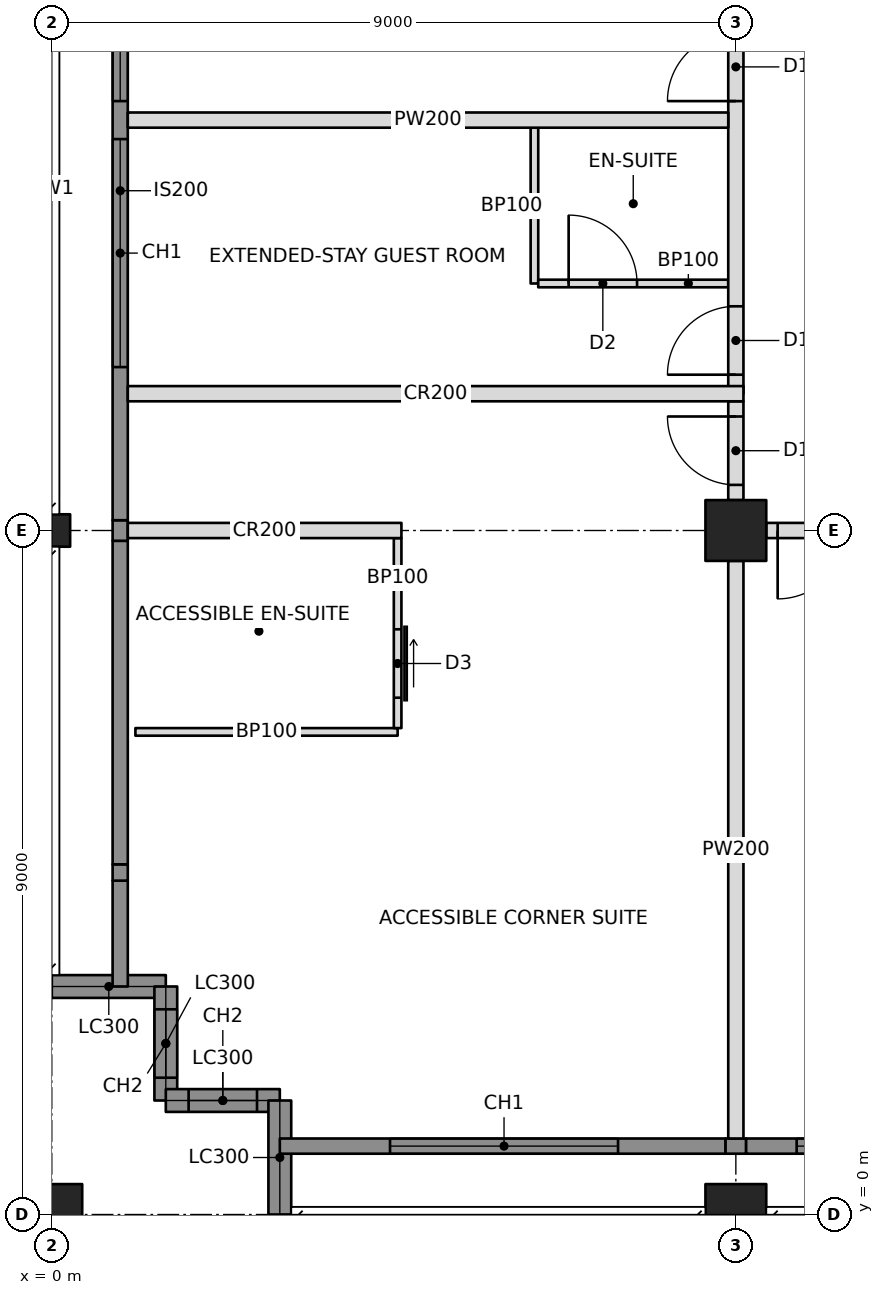
"""IFC4 building model, lengths in metres.
Left out: names, types, materials, properties, quantities, classifications, styles, units other than length and angle.
Written with IfcOpenShell. Run it as: python <this file> out.ifc"""

import sys

from ifc_helpers import new_model, si_unit, direction, frame, frame_2d, origin, origin_with_axes, origin_2d, place, context, subcontext, project, spatial, rectangle, hollow_rectangle, i_section, extrude, element, fill, save


model = new_model("IFC4")
c1 = context("Model", 3, precision=1e-05, world=origin(), true_north=direction((0.0, 1.0)))
c2 = subcontext(c1, "Body", "Model", "MODEL_VIEW")
j1 = project(units=[si_unit("LENGTHUNIT", "METRE"), si_unit("PLANEANGLEUNIT", "RADIAN")], contexts=[c1])
p1 = place(None, origin())
s1 = spatial("IfcSite", under=j1, at=p1, CompositionType="ELEMENT")
p2 = place(p1, origin())
s2 = spatial("IfcBuilding", under=s1, at=p2, CompositionType="ELEMENT")
p3 = place(p2, frame((0.0, 0.0, 214.8)))
s3 = spatial("IfcBuildingStorey", under=s2, at=p3, CompositionType="ELEMENT", Elevation=214.8)
p4 = place(p3, origin_with_axes())
e1 = element("IfcColumn", 1, at=p4, inside=s3, PredefinedType="COLUMN", context=c2, shape_type="SweptSolid", body=[
    extrude(hollow_rectangle(XDim=0.8, YDim=0.8, WallThickness=0.06, at=origin_2d()), origin(), (0.0, 0.0, 1.0), 3.4),
])
p5 = place(p3, frame((0.0, 9.0, 0.0), z_axis=(0.0, 0.0, 1.0), x_axis=(0.0, 1.0, 0.0)))
e2 = element("IfcColumn", 2, at=p5, inside=s3, PredefinedType="COLUMN", context=c2, shape_type="SweptSolid", body=[
    extrude(i_section(OverallWidth=0.427, OverallDepth=0.483, WebThickness=0.051, FlangeThickness=0.082, at=origin_2d()), origin(), (0.0, 0.0, 1.0), 3.4),
])
p6 = place(p3, frame((9.0, 0.0, 0.0), z_axis=(0.0, 0.0, 1.0), x_axis=(1.0, 0.0, 0.0)))
e3 = element("IfcColumn", 3, at=p6, inside=s3, PredefinedType="COLUMN", context=c2, shape_type="SweptSolid", body=[
    extrude(hollow_rectangle(XDim=0.8, YDim=0.8, WallThickness=0.06, at=origin_2d()), origin(), (0.0, 0.0, 1.0), 3.4),
])
p7 = place(p3, frame((9.0, 9.0, 0.0), z_axis=(0.0, 0.0, 1.0), x_axis=(1.0, 0.0, 0.0)))
e4 = element("IfcColumn", 4, at=p7, inside=s3, PredefinedType="COLUMN", context=c2, shape_type="SweptSolid", body=[
    extrude(hollow_rectangle(XDim=0.8, YDim=0.8, WallThickness=0.05, at=origin_2d()), origin(), (0.0, 0.0, 1.0), 3.4),
])
p8 = place(p3, frame((0.0, 3.0, 0.0), z_axis=(0.0, 0.0, 1.0), x_axis=(1.0, 0.0, 0.0)))
e5 = element("IfcWall", 5, at=p8, inside=s3, PredefinedType="SOLIDWALL", context=c2, shape_type="SweptSolid", body=[
    extrude(rectangle(XDim=1.5, YDim=0.3, at=frame_2d((0.75, 0.0))), origin(), (0.0, 0.0, 1.0), 2.42),
])
p9 = place(p3, frame((1.5, 3.0, 0.0), z_axis=(0.0, 0.0, 1.0), x_axis=(0.0, -1.0, 0.0)))
e6 = element("IfcWall", 6, at=p9, inside=s3, PredefinedType="SOLIDWALL", context=c2, shape_type="SweptSolid", body=[
    extrude(rectangle(XDim=1.5, YDim=0.3, at=frame_2d((0.75, 0.0))), origin(), (0.0, 0.0, 1.0), 3.2),
])
p10 = place(p9, frame((0.3, 0.0, 0.6)))
e7 = element("IfcOpeningElement", 7, at=p10, cuts=e6, PredefinedType="OPENING", context=c2, shape_type="SweptSolid", body=[
    extrude(rectangle(XDim=0.9, YDim=2.2, at=frame_2d((0.45, 1.1))), frame((0.0, 0.16, 0.0), z_axis=(0.0, -1.0, 0.0), x_axis=(1.0, 0.0, 0.0)), (0.0, 0.0, 1.0), 0.32),
])
p11 = place(p3, frame((1.5, 1.5, 0.0), z_axis=(0.0, 0.0, 1.0), x_axis=(1.0, 0.0, 0.0)))
e8 = element("IfcWall", 8, at=p11, inside=s3, PredefinedType="SOLIDWALL", context=c2, shape_type="SweptSolid", body=[
    extrude(rectangle(XDim=1.5, YDim=0.3, at=frame_2d((0.75, 0.0))), origin(), (0.0, 0.0, 1.0), 3.2),
])
p12 = place(p11, frame((0.3, 0.0, 0.6)))
e9 = element("IfcOpeningElement", 9, at=p12, cuts=e8, PredefinedType="OPENING", context=c2, shape_type="SweptSolid", body=[
    extrude(rectangle(XDim=0.9, YDim=2.2, at=frame_2d((0.45, 1.1))), frame((0.0, 0.16, 0.0), z_axis=(0.0, -1.0, 0.0), x_axis=(1.0, 0.0, 0.0)), (0.0, 0.0, 1.0), 0.32),
])
p13 = place(p3, frame((3.0, 1.5, 0.0), z_axis=(0.0, 0.0, 1.0), x_axis=(0.0, -1.0, 0.0)))
e10 = element("IfcWall", 10, at=p13, inside=s3, PredefinedType="SOLIDWALL", context=c2, shape_type="SweptSolid", body=[
    extrude(rectangle(XDim=1.5, YDim=0.3, at=frame_2d((0.75, 0.0))), origin(), (0.0, 0.0, 1.0), 2.42),
])
p14 = place(p3, frame((3.0, 0.9, 0.0), z_axis=(0.0, 0.0, 1.0), x_axis=(1.0, 0.0, 0.0)))
e11 = element("IfcWall", 11, at=p14, inside=s3, PredefinedType="SOLIDWALL", context=c2, shape_type="SweptSolid", body=[
    extrude(rectangle(XDim=5.865, YDim=0.2, at=frame_2d((2.932, 0.0))), origin(), (0.0, 0.0, 1.0), 3.2),
])
p15 = place(p14, frame((1.45, 0.0, 0.6)))
e12 = element("IfcOpeningElement", 12, at=p15, cuts=e11, PredefinedType="OPENING", context=c2, shape_type="SweptSolid", body=[
    extrude(rectangle(XDim=3.0, YDim=2.2, at=frame_2d((1.5, 1.1))), frame((0.0, 0.11, 0.0), z_axis=(0.0, -1.0, 0.0), x_axis=(1.0, 0.0, 0.0)), (0.0, 0.0, 1.0), 0.22),
])
p16 = place(p3, frame((0.9, 3.0, 0.0), z_axis=(0.0, 0.0, 1.0), x_axis=(0.0, 1.0, 0.0)))
e13 = element("IfcWall", 13, at=p16, inside=s3, PredefinedType="SOLIDWALL", context=c2, shape_type="SweptSolid", body=[
    extrude(rectangle(XDim=1.393, YDim=0.2, at=frame_2d((0.696, 0.0))), origin(), (0.0, 0.0, 1.0), 3.2),
])
p17 = place(p3, frame((1.0, 9.0, 0.0), z_axis=(0.0, 0.0, 1.0), x_axis=(1.0, 0.0, 0.0)))
e14 = element("IfcWall", 14, at=p17, inside=s3, PredefinedType="PARTITIONING", context=c2, shape_type="SweptSolid", body=[
    extrude(rectangle(XDim=3.6, YDim=0.2, at=frame_2d((1.8, 0.0))), origin(), (0.0, 0.0, 1.0), 2.438),
])
p18 = place(p3, frame((9.4, 9.0, 0.0), z_axis=(0.0, 0.0, 1.0), x_axis=(1.0, 0.0, 0.0)))
e15 = element("IfcWall", 15, at=p18, inside=s3, PredefinedType="PARTITIONING", context=c2, shape_type="SweptSolid", body=[
    extrude(rectangle(XDim=8.2, YDim=0.2, at=frame_2d((4.1, 0.0))), origin(), (0.0, 0.0, 1.0), 2.405),
])
p19 = place(p18, frame((0.15, 0.0, 0.0)))
e16 = element("IfcOpeningElement", 16, at=p19, cuts=e15, PredefinedType="OPENING", context=c2, shape_type="SweptSolid", body=[
    extrude(rectangle(XDim=0.9, YDim=2.1, at=frame_2d((0.45, 1.05))), frame((0.0, 0.11, 0.0), z_axis=(0.0, -1.0, 0.0), x_axis=(1.0, 0.0, 0.0)), (0.0, 0.0, 1.0), 0.22),
])
p20 = place(p3, frame((9.0, 10.8, 0.0), z_axis=(0.0, 0.0, 1.0), x_axis=(0.0, 1.0, 0.0)))
e17 = element("IfcWall", 17, at=p20, inside=s3, PredefinedType="PARTITIONING", context=c2, shape_type="SweptSolid", body=[
    extrude(rectangle(XDim=6.8, YDim=0.2, at=frame_2d((3.4, 0.0))), origin(), (0.0, 0.0, 1.0), 2.405),
])
p21 = place(p20, frame((0.25, 0.0, 0.0)))
e18 = element("IfcOpeningElement", 18, at=p21, cuts=e17, PredefinedType="OPENING", context=c2, shape_type="SweptSolid", body=[
    extrude(rectangle(XDim=0.9, YDim=2.1, at=frame_2d((0.45, 1.05))), frame((0.0, 0.11, 0.0), z_axis=(0.0, -1.0, 0.0), x_axis=(1.0, 0.0, 0.0)), (0.0, 0.0, 1.0), 0.22),
])
p22 = place(p20, frame((3.85, 0.0, 0.0)))
e19 = element("IfcOpeningElement", 19, at=p22, cuts=e17, PredefinedType="OPENING", context=c2, shape_type="SweptSolid", body=[
    extrude(rectangle(XDim=0.9, YDim=2.1, at=frame_2d((0.45, 1.05))), frame((0.0, 0.11, 0.0), z_axis=(0.0, -1.0, 0.0), x_axis=(1.0, 0.0, 0.0)), (0.0, 0.0, 1.0), 0.22),
])
p23 = place(p3, frame((1.0, 10.8, 0.0), z_axis=(0.0, 0.0, 1.0), x_axis=(1.0, 0.0, 0.0)))
e20 = element("IfcWall", 20, at=p23, inside=s3, PredefinedType="PARTITIONING", context=c2, shape_type="SweptSolid", body=[
    extrude(rectangle(XDim=8.1, YDim=0.2, at=frame_2d((4.05, 0.0))), origin(), (0.0, 0.0, 1.0), 2.404),
])
p24 = place(p3, frame((9.0, 8.6, 0.0), z_axis=(0.0, 0.0, 1.0), x_axis=(0.0, -1.0, 0.0)))
e21 = element("IfcWall", 21, at=p24, inside=s3, PredefinedType="PARTITIONING", context=c2, shape_type="SweptSolid", body=[
    extrude(rectangle(XDim=7.6, YDim=0.2, at=frame_2d((3.8, 0.0))), origin(), (0.0, 0.0, 1.0), 2.438),
])
p25 = place(p3, frame((1.1, 6.35, 0.0), z_axis=(0.0, 0.0, 1.0), x_axis=(1.0, 0.0, 0.0)))
e22 = element("IfcWall", 22, at=p25, inside=s3, PredefinedType="PARTITIONING", context=c2, shape_type="SweptSolid", body=[
    extrude(rectangle(XDim=3.45, YDim=0.1, at=frame_2d((1.725, 0.0))), origin(), (0.0, 0.0, 1.0), 3.2),
])
p26 = place(p3, frame((4.55, 8.9, 0.0), z_axis=(0.0, 0.0, 1.0), x_axis=(0.0, -1.0, 0.0)))
e23 = element("IfcWall", 23, at=p26, inside=s3, PredefinedType="PARTITIONING", context=c2, shape_type="SweptSolid", body=[
    extrude(rectangle(XDim=2.5, YDim=0.1, at=frame_2d((1.25, 0.0))), origin(), (0.0, 0.0, 1.0), 2.438),
])
p27 = place(p26, frame((1.2, 0.0, 0.0)))
e24 = element("IfcOpeningElement", 24, at=p27, cuts=e23, PredefinedType="OPENING", context=c2, shape_type="SweptSolid", body=[
    extrude(rectangle(XDim=0.9, YDim=2.1, at=frame_2d((0.45, 1.05))), frame((0.0, 0.06, 0.0), z_axis=(0.0, -1.0, 0.0), x_axis=(1.0, 0.0, 0.0)), (0.0, 0.0, 1.0), 0.12),
])
p28 = place(p3, frame((8.9, 14.4, 0.0), z_axis=(0.0, 0.0, 1.0), x_axis=(-1.0, 0.0, 0.0)))
e25 = element("IfcWall", 25, at=p28, inside=s3, PredefinedType="PARTITIONING", context=c2, shape_type="SweptSolid", body=[
    extrude(rectangle(XDim=7.9, YDim=0.2, at=frame_2d((3.95, 0.0))), origin(), (0.0, 0.0, 1.0), 2.404),
])
p29 = place(p3, frame((6.35, 12.25, 0.0), z_axis=(0.0, 0.0, 1.0), x_axis=(0.0, 1.0, 0.0)))
e26 = element("IfcWall", 26, at=p29, inside=s3, PredefinedType="PARTITIONING", context=c2, shape_type="SweptSolid", body=[
    extrude(rectangle(XDim=2.05, YDim=0.1, at=frame_2d((1.025, 0.0))), origin(), (0.0, 0.0, 1.0), 3.2),
])
p30 = place(p3, frame((8.9, 12.25, 0.0), z_axis=(0.0, 0.0, 1.0), x_axis=(-1.0, 0.0, 0.0)))
e27 = element("IfcWall", 27, at=p30, inside=s3, PredefinedType="PARTITIONING", context=c2, shape_type="SweptSolid", body=[
    extrude(rectangle(XDim=2.5, YDim=0.1, at=frame_2d((1.25, 0.0))), origin(), (0.0, 0.0, 1.0), 2.404),
])
p31 = place(p30, frame((1.2, 0.0, 0.0)))
e28 = element("IfcOpeningElement", 28, at=p31, cuts=e27, PredefinedType="OPENING", context=c2, shape_type="SweptSolid", body=[
    extrude(rectangle(XDim=0.9, YDim=2.1, at=frame_2d((0.45, 1.05))), frame((0.0, 0.06, 0.0), z_axis=(0.0, -1.0, 0.0), x_axis=(1.0, 0.0, 0.0)), (0.0, 0.0, 1.0), 0.12),
])
p32 = place(p3, frame((9.0, 9.4, 0.0), z_axis=(0.0, 0.0, 1.0), x_axis=(0.0, 1.0, 0.0)))
e29 = element("IfcWall", 29, at=p32, inside=s3, PredefinedType="PARTITIONING", context=c2, shape_type="SweptSolid", body=[
    extrude(rectangle(XDim=1.3, YDim=0.2, at=frame_2d((0.65, 0.0))), origin(), (0.0, 0.0, 1.0), 2.405),
])
p33 = place(p32, frame((0.2, 0.0, 0.0)))
e30 = element("IfcOpeningElement", 30, at=p33, cuts=e29, PredefinedType="OPENING", context=c2, shape_type="SweptSolid", body=[
    extrude(rectangle(XDim=0.9, YDim=2.1, at=frame_2d((0.45, 1.05))), frame((0.0, 0.11, 0.0), z_axis=(0.0, -1.0, 0.0), x_axis=(1.0, 0.0, 0.0)), (0.0, 0.0, 1.0), 0.22),
])
p34 = place(p3, frame((8.865, 0.9, 0.0), z_axis=(0.0, 0.0, 1.0), x_axis=(1.0, 0.0, 0.0)))
e31 = element("IfcWall", 31, at=p34, inside=s3, PredefinedType="SOLIDWALL", context=c2, shape_type="SweptSolid", body=[
    extrude(rectangle(XDim=0.271, YDim=0.2, at=frame_2d((0.135, 0.0))), origin(), (0.0, 0.0, 1.0), 2.438),
])
p35 = place(p3, frame((9.135, 0.9, 0.0), z_axis=(0.0, 0.0, 1.0), x_axis=(1.0, 0.0, 0.0)))
e32 = element("IfcWall", 32, at=p35, inside=s3, PredefinedType="SOLIDWALL", context=c2, shape_type="SweptSolid", body=[
    extrude(rectangle(XDim=8.671, YDim=0.2, at=frame_2d((4.335, 0.0))), origin(), (0.0, 0.0, 1.0), 3.2),
])
p36 = place(p35, frame((0.665, 0.0, 0.6)))
e33 = element("IfcOpeningElement", 33, at=p36, cuts=e32, PredefinedType="OPENING", context=c2, shape_type="SweptSolid", body=[
    extrude(rectangle(XDim=3.0, YDim=2.2, at=frame_2d((1.5, 1.1))), frame((0.0, 0.11, 0.0), z_axis=(0.0, -1.0, 0.0), x_axis=(1.0, 0.0, 0.0)), (0.0, 0.0, 1.0), 0.22),
])
p37 = place(p35, frame((5.065, 0.0, 0.6)))
e34 = element("IfcOpeningElement", 34, at=p37, cuts=e32, PredefinedType="OPENING", context=c2, shape_type="SweptSolid", body=[
    extrude(rectangle(XDim=3.0, YDim=2.2, at=frame_2d((1.5, 1.1))), frame((0.0, 0.11, 0.0), z_axis=(0.0, -1.0, 0.0), x_axis=(1.0, 0.0, 0.0)), (0.0, 0.0, 1.0), 0.22),
])
p38 = place(p3, frame((0.9, 4.393, 0.0), z_axis=(0.0, 0.0, 1.0), x_axis=(0.0, 1.0, 0.0)))
e35 = element("IfcWall", 35, at=p38, inside=s3, PredefinedType="SOLIDWALL", context=c2, shape_type="SweptSolid", body=[
    extrude(rectangle(XDim=0.215, YDim=0.2, at=frame_2d((0.107, 0.0))), origin(), (0.0, 0.0, 1.0), 2.661),
])
p39 = place(p3, frame((0.9, 4.607, 0.0), z_axis=(0.0, 0.0, 1.0), x_axis=(0.0, 1.0, 0.0)))
e36 = element("IfcWall", 36, at=p39, inside=s3, PredefinedType="SOLIDWALL", context=c2, shape_type="SweptSolid", body=[
    extrude(rectangle(XDim=4.257, YDim=0.2, at=frame_2d((2.129, 0.0))), origin(), (0.0, 0.0, 1.0), 3.2),
])
p40 = place(p3, frame((0.9, 8.865, 0.0), z_axis=(0.0, 0.0, 1.0), x_axis=(0.0, 1.0, 0.0)))
e37 = element("IfcWall", 37, at=p40, inside=s3, PredefinedType="SOLIDWALL", context=c2, shape_type="SweptSolid", body=[
    extrude(rectangle(XDim=0.271, YDim=0.2, at=frame_2d((0.135, 0.0))), origin(), (0.0, 0.0, 1.0), 2.438),
])
p41 = place(p3, frame((0.9, 9.135, 0.0), z_axis=(0.0, 0.0, 1.0), x_axis=(0.0, 1.0, 0.0)))
e38 = element("IfcWall", 38, at=p41, inside=s3, PredefinedType="SOLIDWALL", context=c2, shape_type="SweptSolid", body=[
    extrude(rectangle(XDim=8.671, YDim=0.2, at=frame_2d((4.335, 0.0))), origin(), (0.0, 0.0, 1.0), 3.2),
])
p42 = place(p41, frame((2.015, 0.0, 0.6)))
e39 = element("IfcOpeningElement", 39, at=p42, cuts=e38, PredefinedType="OPENING", context=c2, shape_type="SweptSolid", body=[
    extrude(rectangle(XDim=3.0, YDim=2.2, at=frame_2d((1.5, 1.1))), frame((0.0, 0.11, 0.0), z_axis=(0.0, -1.0, 0.0), x_axis=(1.0, 0.0, 0.0)), (0.0, 0.0, 1.0), 0.22),
])
p43 = place(p41, frame((5.515, 0.0, 0.6)))
e40 = element("IfcOpeningElement", 40, at=p43, cuts=e38, PredefinedType="OPENING", context=c2, shape_type="SweptSolid", body=[
    extrude(rectangle(XDim=3.0, YDim=2.2, at=frame_2d((1.5, 1.1))), frame((0.0, 0.11, 0.0), z_axis=(0.0, -1.0, 0.0), x_axis=(1.0, 0.0, 0.0)), (0.0, 0.0, 1.0), 0.22),
])
p44 = place(p10, origin())
e41 = element("IfcWindow", 41, at=p44, inside=s3, PartitioningType="SINGLE_PANEL", PredefinedType="WINDOW", context=c2, shape_type="SweptSolid", body=[
    extrude(rectangle(XDim=0.9, YDim=2.2, at=frame_2d((0.45, 1.1))), frame((0.0, 0.03, 0.0), z_axis=(0.0, -1.0, 0.0), x_axis=(1.0, 0.0, 0.0)), (0.0, 0.0, 1.0), 0.06),
])
fill(e7, e41)
p45 = place(p12, origin())
e42 = element("IfcWindow", 42, at=p45, inside=s3, PartitioningType="SINGLE_PANEL", PredefinedType="WINDOW", context=c2, shape_type="SweptSolid", body=[
    extrude(rectangle(XDim=0.9, YDim=2.2, at=frame_2d((0.45, 1.1))), frame((0.0, 0.03, 0.0), z_axis=(0.0, -1.0, 0.0), x_axis=(1.0, 0.0, 0.0)), (0.0, 0.0, 1.0), 0.06),
])
fill(e9, e42)
p46 = place(p15, origin())
e43 = element("IfcWindow", 43, at=p46, inside=s3, PartitioningType="TRIPLE_PANEL_VERTICAL", PredefinedType="WINDOW", context=c2, shape_type="SweptSolid", body=[
    extrude(rectangle(XDim=3.0, YDim=2.2, at=frame_2d((1.5, 1.1))), frame((0.0, 0.03, 0.0), z_axis=(0.0, -1.0, 0.0), x_axis=(1.0, 0.0, 0.0)), (0.0, 0.0, 1.0), 0.06),
])
fill(e12, e43)
p47 = place(p36, origin())
e44 = element("IfcWindow", 44, at=p47, inside=s3, PartitioningType="TRIPLE_PANEL_VERTICAL", PredefinedType="WINDOW", context=c2, shape_type="SweptSolid", body=[
    extrude(rectangle(XDim=3.0, YDim=2.2, at=frame_2d((1.5, 1.1))), frame((0.0, 0.03, 0.0), z_axis=(0.0, -1.0, 0.0), x_axis=(1.0, 0.0, 0.0)), (0.0, 0.0, 1.0), 0.06),
])
fill(e33, e44)
p48 = place(p42, origin())
e45 = element("IfcWindow", 45, at=p48, inside=s3, PartitioningType="TRIPLE_PANEL_VERTICAL", PredefinedType="WINDOW", context=c2, shape_type="SweptSolid", body=[
    extrude(rectangle(XDim=3.0, YDim=2.2, at=frame_2d((1.5, 1.1))), frame((0.0, 0.03, 0.0), z_axis=(0.0, -1.0, 0.0), x_axis=(1.0, 0.0, 0.0)), (0.0, 0.0, 1.0), 0.06),
])
fill(e39, e45)
p49 = place(p43, origin())
e46 = element("IfcWindow", 46, at=p49, inside=s3, PartitioningType="TRIPLE_PANEL_VERTICAL", PredefinedType="WINDOW", context=c2, shape_type="SweptSolid", body=[
    extrude(rectangle(XDim=3.0, YDim=2.2, at=frame_2d((1.5, 1.1))), frame((0.0, 0.03, 0.0), z_axis=(0.0, -1.0, 0.0), x_axis=(1.0, 0.0, 0.0)), (0.0, 0.0, 1.0), 0.06),
])
fill(e40, e46)
p50 = place(p27, origin())
e47 = element("IfcDoor", 47, at=p50, inside=s3, OperationType="SLIDING_TO_LEFT", PredefinedType="DOOR", context=c2, shape_type="SweptSolid", body=[
    extrude(rectangle(XDim=0.9, YDim=2.1, at=frame_2d((0.45, 1.05))), frame((0.0, 0.025, 0.0), z_axis=(0.0, -1.0, 0.0), x_axis=(1.0, 0.0, 0.0)), (0.0, 0.0, 1.0), 0.05),
])
fill(e24, e47)
p51 = place(p19, frame((0.9, 0.0, 0.0), z_axis=(0.0, 0.0, 1.0), x_axis=(-1.0, 0.0, 0.0)))
e48 = element("IfcDoor", 48, at=p51, inside=s3, OperationType="SINGLE_SWING_RIGHT", PredefinedType="DOOR", context=c2, shape_type="SweptSolid", body=[
    extrude(rectangle(XDim=0.9, YDim=2.1, at=frame_2d((0.45, 1.05))), frame((0.0, 0.025, 0.0), z_axis=(0.0, -1.0, 0.0), x_axis=(1.0, 0.0, 0.0)), (0.0, 0.0, 1.0), 0.05),
])
fill(e16, e48)
p52 = place(p31, frame((0.9, 0.0, 0.0), z_axis=(0.0, 0.0, 1.0), x_axis=(-1.0, 0.0, 0.0)))
e49 = element("IfcDoor", 49, at=p52, inside=s3, OperationType="SINGLE_SWING_LEFT", PredefinedType="DOOR", context=c2, shape_type="SweptSolid", body=[
    extrude(rectangle(XDim=0.9, YDim=2.1, at=frame_2d((0.45, 1.05))), frame((0.0, 0.025, 0.0), z_axis=(0.0, -1.0, 0.0), x_axis=(1.0, 0.0, 0.0)), (0.0, 0.0, 1.0), 0.05),
])
fill(e28, e49)
p53 = place(p21, origin())
e50 = element("IfcDoor", 50, at=p53, inside=s3, OperationType="SINGLE_SWING_LEFT", PredefinedType="DOOR", context=c2, shape_type="SweptSolid", body=[
    extrude(rectangle(XDim=0.9, YDim=2.1, at=frame_2d((0.45, 1.05))), frame((0.0, 0.025, 0.0), z_axis=(0.0, -1.0, 0.0), x_axis=(1.0, 0.0, 0.0)), (0.0, 0.0, 1.0), 0.05),
])
fill(e18, e50)
p54 = place(p22, origin())
e51 = element("IfcDoor", 51, at=p54, inside=s3, OperationType="SINGLE_SWING_LEFT", PredefinedType="DOOR", context=c2, shape_type="SweptSolid", body=[
    extrude(rectangle(XDim=0.9, YDim=2.1, at=frame_2d((0.45, 1.05))), frame((0.0, 0.025, 0.0), z_axis=(0.0, -1.0, 0.0), x_axis=(1.0, 0.0, 0.0)), (0.0, 0.0, 1.0), 0.05),
])
fill(e19, e51)
p55 = place(p33, origin())
e52 = element("IfcDoor", 52, at=p55, inside=s3, OperationType="SINGLE_SWING_RIGHT", PredefinedType="DOOR", context=c2, shape_type="SweptSolid", body=[
    extrude(rectangle(XDim=0.9, YDim=2.1, at=frame_2d((0.45, 1.05))), frame((0.0, 0.025, 0.0), z_axis=(0.0, -1.0, 0.0), x_axis=(1.0, 0.0, 0.0)), (0.0, 0.0, 1.0), 0.05),
])
fill(e30, e52)
save(model, sys.argv[1])
